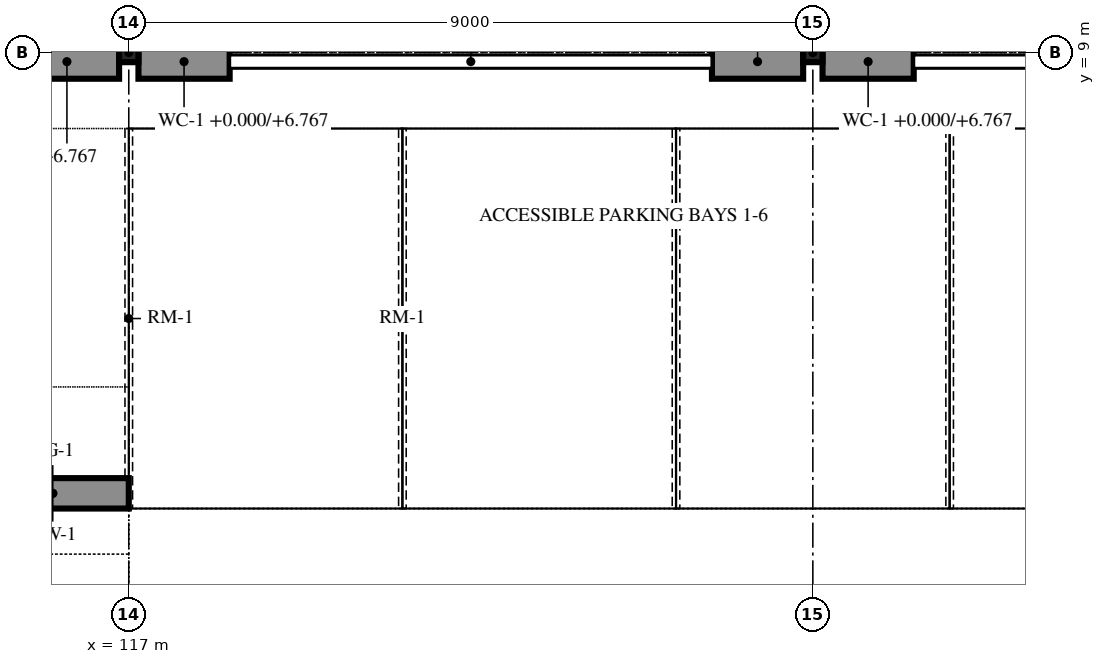
"""IFC4 building model, lengths in metres.
Left out: names, types, materials, properties, quantities, classifications, styles, units other than length and angle.
Written with IfcOpenShell. Run it as: python <this file> out.ifc"""

import sys

from ifc_helpers import new_model, si_unit, direction, frame, frame_2d, origin, origin_2d, place, context, subcontext, project, spatial, rectangle, i_section, extrude, element, save


model = new_model("IFC4")
c1 = context("Model", 3, precision=1e-05, world=origin(), true_north=direction((0.0, 1.0)))
c2 = subcontext(c1, "Body", "Model", "MODEL_VIEW")
j1 = project(units=[si_unit("LENGTHUNIT", "METRE"), si_unit("PLANEANGLEUNIT", "RADIAN")], contexts=[c1])
p1 = place(None, origin())
s1 = spatial("IfcSite", under=j1, at=p1, CompositionType="ELEMENT")
p2 = place(p1, origin())
s2 = spatial("IfcBuilding", under=s1, at=p2, CompositionType="ELEMENT")
p3 = place(p2, origin())
s3 = spatial("IfcBuildingStorey", under=s2, at=p3, CompositionType="ELEMENT", Elevation=0.0)
for number, where, z_axis, x_axis in (
    (1, (117.0, 9.0, -2.1), (0.0, 0.0, 1.0), (1.0, 0.0, 0.0)),
    (2, (126.0, 9.0, -2.1), (0.0, 0.0, 1.0), (1.0, 0.0, 0.0)),
):
    element("IfcColumn", number, at=place(p3, frame(where, z_axis=z_axis, x_axis=x_axis)), inside=s3, PredefinedType="COLUMN", context=c2, shape_type="SweptSolid", body=[
        extrude(i_section(OverallWidth=0.255, OverallDepth=0.254, WebThickness=0.009, FlangeThickness=0.014, FilletRadius=0.013, at=origin_2d()), origin(), (0.0, 0.0, 1.0), 9.6),
    ])
p4 = place(p3, frame((115.5, 8.88, 0.0), z_axis=(0.0, 0.0, 1.0), x_axis=(1.0, 0.0, 0.0)))
e3 = element("IfcWall", 3, at=p4, inside=s3, PredefinedType="SOLIDWALL", context=c2, shape_type="SweptSolid", body=[
    extrude(rectangle(XDim=1.373, YDim=0.45, at=frame_2d((0.687, 0.0))), origin(), (0.0, 0.0, 1.0), 6.767),
])
for number, where, z_axis, x_axis in (
    (4, (117.127, 8.88, 0.0), (0.0, 0.0, 1.0), (1.0, 0.0, 0.0)),
    (5, (124.673, 8.88, 0.0), (0.0, 0.0, 1.0), (1.0, 0.0, 0.0)),
    (6, (126.127, 8.88, 0.0), (0.0, 0.0, 1.0), (1.0, 0.0, 0.0)),
):
    element("IfcWall", number, at=place(p3, frame(where, z_axis=z_axis, x_axis=x_axis)), inside=s3, PredefinedType="SOLIDWALL", context=c2, shape_type="SweptSolid", body=[
        extrude(rectangle(XDim=1.2, YDim=0.45, at=frame_2d((0.6, 0.0))), origin(), (0.0, 0.0, 1.0), 6.767),
    ])
p5 = place(p3, frame((115.0, 3.2, -0.8), z_axis=(0.0, 0.0, 1.0), x_axis=(1.0, 0.0, 0.0)))
e7 = element("IfcWall", 7, at=p5, inside=s3, PredefinedType="SOLIDWALL", context=c2, shape_type="SweptSolid", body=[
    extrude(rectangle(XDim=2.0, YDim=0.4, at=frame_2d((1.0, 0.0))), origin(), (0.0, 0.0, 1.0), 0.8),
])
save(model, sys.argv[1])
